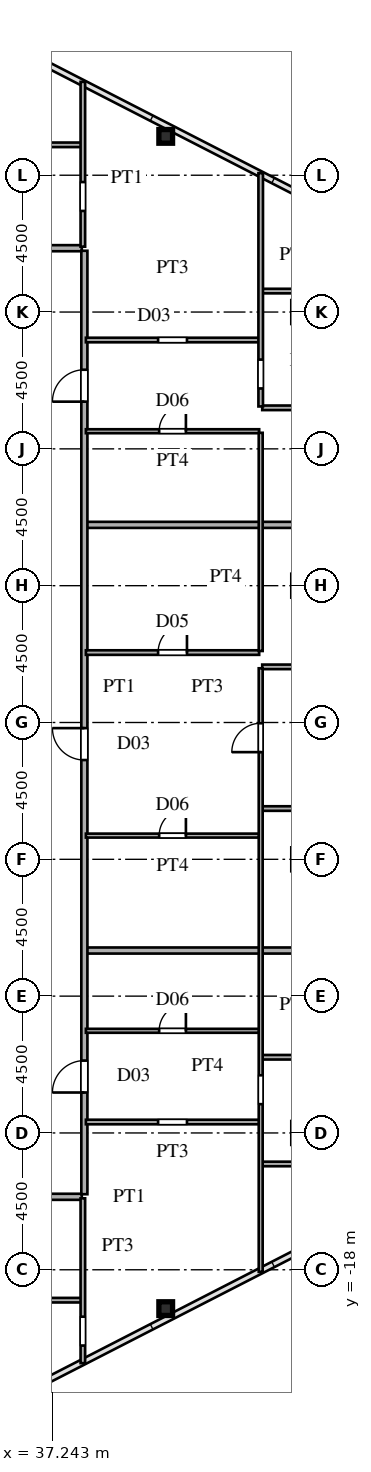
"""IFC4 building model, lengths in metres.
Left out: names, types, materials, properties, quantities, classifications, styles, units other than length and angle.
Written with IfcOpenShell. Run it as: python <this file> out.ifc"""

import sys

from ifc_helpers import new_model, si_unit, direction, frame, frame_2d, origin, origin_2d, place, context, subcontext, project, spatial, rectangle, hollow_rectangle, extrude, source, transform, mapped, element, fill, save


model = new_model("IFC4")
c1 = context("Model", 3, precision=1e-05, world=origin(), true_north=direction((0.0, 1.0)))
c2 = subcontext(c1, "Body", "Model", "MODEL_VIEW")
j1 = project(units=[si_unit("LENGTHUNIT", "METRE"), si_unit("PLANEANGLEUNIT", "RADIAN")], contexts=[c1])
p1 = place(None, origin())
s1 = spatial("IfcSite", under=j1, at=p1, CompositionType="ELEMENT")
p2 = place(p1, origin())
s2 = spatial("IfcBuilding", under=s1, at=p2, CompositionType="ELEMENT")
p3 = place(p2, frame((0.0, 0.0, 114.0)))
s3 = spatial("IfcBuildingStorey", under=s2, at=p3, CompositionType="ELEMENT", Elevation=114.0)
m1 = source(origin(), c2, "Body", "SweptSolid", [
    extrude(hollow_rectangle(XDim=0.45, YDim=0.45, WallThickness=0.018, at=origin_2d()), origin(), (0.0, 0.0, 1.0), 3.6),
])
for number, where, z_axis, x_axis in (
    (1, (40.976, -19.278, 0.0), (0.0, 0.0, 1.0), (1.0, 0.0, 0.0)),
    (2, (40.976, 19.278, 0.0), (0.0, 0.0, 1.0), (1.0, 0.0, 0.0)),
):
    element("IfcColumn", number, at=place(p3, frame(where, z_axis=z_axis, x_axis=x_axis)), inside=s3, PredefinedType="COLUMN", context=c2, shape_type="MappedRepresentation", body=[
        mapped(m1, transform((0.0, 0.0, 0.0), scale=1.0)),
    ])
p4 = place(p3, frame((27.465, -19.0, 0.0), z_axis=(0.0, 0.0, 1.0), x_axis=(1.0, 0.0, 0.0)))
e3 = element("IfcWall", 3, at=p4, inside=s3, PredefinedType="PARTITIONING", context=c2, shape_type="SweptSolid", body=[
    extrude(rectangle(XDim=10.735, YDim=0.15, at=frame_2d((5.367, 0.0))), origin(), (0.0, 0.0, 1.0), 3.38),
])
p5 = place(p4, frame((4.935, 0.0, 0.0)))
e4 = element("IfcOpeningElement", 4, at=p5, cuts=e3, PredefinedType="OPENING", context=c2, shape_type="SweptSolid", body=[
    extrude(rectangle(XDim=0.95, YDim=2.15, at=frame_2d((0.475, 1.075))), frame((0.0, 0.085, 0.0), z_axis=(0.0, -1.0, 0.0), x_axis=(1.0, 0.0, 0.0)), (0.0, 0.0, 1.0), 0.17),
])
p6 = place(p3, frame((36.585, -15.6, 0.0), z_axis=(0.0, 0.0, 1.0), x_axis=(1.0, 0.0, 0.0)))
e5 = element("IfcWall", 5, at=p6, inside=s3, PredefinedType="PARTITIONING", context=c2, shape_type="SweptSolid", body=[
    extrude(rectangle(XDim=1.63, YDim=0.2, at=frame_2d((0.815, 0.0))), origin(), (0.0, 0.0, 1.0), 3.38),
])
p7 = place(p3, frame((44.15, -14.52, 0.0), z_axis=(0.0, 0.0, 1.0), x_axis=(1.0, 0.0, 0.0)))
e6 = element("IfcWall", 6, at=p7, inside=s3, PredefinedType="PARTITIONING", context=c2, shape_type="SweptSolid", body=[
    extrude(rectangle(XDim=6.828, YDim=0.15, at=frame_2d((3.414, 0.0))), origin(), (0.0, 0.0, 1.0), 2.78),
])
p8 = place(p7, frame((2.896, 0.0, 0.0)))
e7 = element("IfcOpeningElement", 7, at=p8, cuts=e6, PredefinedType="OPENING", context=c2, shape_type="SweptSolid", body=[
    extrude(rectangle(XDim=0.95, YDim=2.15, at=frame_2d((0.475, 1.075))), frame((0.0, 0.085, 0.0), z_axis=(0.0, -1.0, 0.0), x_axis=(1.0, 0.0, 0.0)), (0.0, 0.0, 1.0), 0.17),
])
p9 = place(p3, frame((38.35, -13.14, 0.0), z_axis=(0.0, 0.0, 1.0), x_axis=(1.0, 0.0, 0.0)))
e8 = element("IfcWall", 8, at=p9, inside=s3, PredefinedType="PARTITIONING", context=c2, shape_type="SweptSolid", body=[
    extrude(rectangle(XDim=5.7, YDim=0.15, at=frame_2d((2.85, 0.0))), origin(), (0.0, 0.0, 1.0), 3.38),
])
p10 = place(p9, frame((2.375, 0.0, 0.0)))
e9 = element("IfcOpeningElement", 9, at=p10, cuts=e8, PredefinedType="OPENING", context=c2, shape_type="SweptSolid", body=[
    extrude(rectangle(XDim=0.95, YDim=2.15, at=frame_2d((0.475, 1.075))), frame((0.0, 0.085, 0.0), z_axis=(0.0, -1.0, 0.0), x_axis=(1.0, 0.0, 0.0)), (0.0, 0.0, 1.0), 0.17),
])
p11 = place(p3, frame((44.15, -11.01, 0.0), z_axis=(0.0, 0.0, 1.0), x_axis=(1.0, 0.0, 0.0)))
e10 = element("IfcWall", 10, at=p11, inside=s3, PredefinedType="PARTITIONING", context=c2, shape_type="SweptSolid", body=[
    extrude(rectangle(XDim=10.3, YDim=0.15, at=frame_2d((5.15, 0.0))), origin(), (0.0, 0.0, 1.0), 3.38),
])
p12 = place(p11, frame((4.675, 0.0, 0.0)))
e11 = element("IfcOpeningElement", 11, at=p12, cuts=e10, PredefinedType="OPENING", context=c2, shape_type="SweptSolid", body=[
    extrude(rectangle(XDim=0.95, YDim=2.15, at=frame_2d((0.475, 1.075))), frame((0.0, 0.085, 0.0), z_axis=(0.0, -1.0, 0.0), x_axis=(1.0, 0.0, 0.0)), (0.0, 0.0, 1.0), 0.17),
])
p13 = place(p3, frame((38.35, -10.14, 0.0), z_axis=(0.0, 0.0, 1.0), x_axis=(1.0, 0.0, 0.0)))
e12 = element("IfcWall", 12, at=p13, inside=s3, PredefinedType="PARTITIONING", context=c2, shape_type="SweptSolid", body=[
    extrude(rectangle(XDim=5.7, YDim=0.13, at=frame_2d((2.85, 0.0))), origin(), (0.0, 0.0, 1.0), 3.38),
])
p14 = place(p13, frame((2.41, 0.0, 0.0)))
e13 = element("IfcOpeningElement", 13, at=p14, cuts=e12, PredefinedType="OPENING", context=c2, shape_type="SweptSolid", body=[
    extrude(rectangle(XDim=0.88, YDim=2.1, at=frame_2d((0.44, 1.05))), frame((0.0, 0.075, 0.0), z_axis=(0.0, -1.0, 0.0), x_axis=(1.0, 0.0, 0.0)), (0.0, 0.0, 1.0), 0.15),
])
p15 = place(p3, frame((38.38, -7.5, 0.0), z_axis=(0.0, 0.0, 1.0), x_axis=(1.0, 0.0, 0.0)))
e14 = element("IfcWall", 14, at=p15, inside=s3, PredefinedType="PARTITIONING", context=c2, shape_type="SweptSolid", body=[
    extrude(rectangle(XDim=26.259, YDim=0.2, at=frame_2d((13.129, 0.0))), origin(), (0.0, 0.0, 1.0), 3.38),
])
p16 = place(p3, frame((38.35, -3.72, 0.0), z_axis=(0.0, 0.0, 1.0), x_axis=(1.0, 0.0, 0.0)))
e15 = element("IfcWall", 15, at=p16, inside=s3, PredefinedType="PARTITIONING", context=c2, shape_type="SweptSolid", body=[
    extrude(rectangle(XDim=5.7, YDim=0.13, at=frame_2d((2.85, 0.0))), origin(), (0.0, 0.0, 1.0), 3.38),
])
p17 = place(p16, frame((2.41, 0.0, 0.0)))
e16 = element("IfcOpeningElement", 16, at=p17, cuts=e15, PredefinedType="OPENING", context=c2, shape_type="SweptSolid", body=[
    extrude(rectangle(XDim=0.88, YDim=2.1, at=frame_2d((0.44, 1.05))), frame((0.0, 0.075, 0.0), z_axis=(0.0, -1.0, 0.0), x_axis=(1.0, 0.0, 0.0)), (0.0, 0.0, 1.0), 0.15),
])
p18 = place(p3, frame((44.15, -2.83, 0.0), z_axis=(0.0, 0.0, 1.0), x_axis=(1.0, 0.0, 0.0)))
e17 = element("IfcWall", 17, at=p18, inside=s3, PredefinedType="PARTITIONING", context=c2, shape_type="SweptSolid", body=[
    extrude(rectangle(XDim=25.385, YDim=0.15, at=frame_2d((12.692, 0.0))), origin(), (0.0, 0.0, 1.0), 3.38),
])
p19 = place(p18, frame((4.675, 0.0, 0.0)))
e18 = element("IfcOpeningElement", 18, at=p19, cuts=e17, PredefinedType="OPENING", context=c2, shape_type="SweptSolid", body=[
    extrude(rectangle(XDim=0.95, YDim=2.15, at=frame_2d((0.475, 1.075))), frame((0.0, 0.085, 0.0), z_axis=(0.0, -1.0, 0.0), x_axis=(1.0, 0.0, 0.0)), (0.0, 0.0, 1.0), 0.17),
])
p20 = place(p18, frame((12.725, 0.0, 0.0)))
e19 = element("IfcOpeningElement", 19, at=p20, cuts=e17, PredefinedType="OPENING", context=c2, shape_type="SweptSolid", body=[
    extrude(rectangle(XDim=0.95, YDim=2.15, at=frame_2d((0.475, 1.075))), frame((0.0, 0.085, 0.0), z_axis=(0.0, -1.0, 0.0), x_axis=(1.0, 0.0, 0.0)), (0.0, 0.0, 1.0), 0.17),
])
p21 = place(p3, frame((44.15, 1.83, 0.0), z_axis=(0.0, 0.0, 1.0), x_axis=(1.0, 0.0, 0.0)))
e20 = element("IfcWall", 20, at=p21, inside=s3, PredefinedType="PARTITIONING", context=c2, shape_type="SweptSolid", body=[
    extrude(rectangle(XDim=25.385, YDim=0.15, at=frame_2d((12.692, 0.0))), origin(), (0.0, 0.0, 1.0), 3.38),
])
p22 = place(p21, frame((4.675, 0.0, 0.0)))
e21 = element("IfcOpeningElement", 21, at=p22, cuts=e20, PredefinedType="OPENING", context=c2, shape_type="SweptSolid", body=[
    extrude(rectangle(XDim=0.95, YDim=2.15, at=frame_2d((0.475, 1.075))), frame((0.0, 0.085, 0.0), z_axis=(0.0, -1.0, 0.0), x_axis=(1.0, 0.0, 0.0)), (0.0, 0.0, 1.0), 0.17),
])
p23 = place(p21, frame((12.725, 0.0, 0.0)))
e22 = element("IfcOpeningElement", 22, at=p23, cuts=e20, PredefinedType="OPENING", context=c2, shape_type="SweptSolid", body=[
    extrude(rectangle(XDim=0.95, YDim=2.15, at=frame_2d((0.475, 1.075))), frame((0.0, 0.085, 0.0), z_axis=(0.0, -1.0, 0.0), x_axis=(1.0, 0.0, 0.0)), (0.0, 0.0, 1.0), 0.17),
])
p24 = place(p3, frame((38.35, 2.3, 0.0), z_axis=(0.0, 0.0, 1.0), x_axis=(1.0, 0.0, 0.0)))
e23 = element("IfcWall", 23, at=p24, inside=s3, PredefinedType="PARTITIONING", context=c2, shape_type="SweptSolid", body=[
    extrude(rectangle(XDim=5.7, YDim=0.15, at=frame_2d((2.85, 0.0))), origin(), (0.0, 0.0, 1.0), 3.38),
])
p25 = place(p24, frame((2.375, 0.0, 0.0)))
e24 = element("IfcOpeningElement", 24, at=p25, cuts=e23, PredefinedType="OPENING", context=c2, shape_type="SweptSolid", body=[
    extrude(rectangle(XDim=0.95, YDim=2.15, at=frame_2d((0.475, 1.075))), frame((0.0, 0.085, 0.0), z_axis=(0.0, -1.0, 0.0), x_axis=(1.0, 0.0, 0.0)), (0.0, 0.0, 1.0), 0.17),
])
p26 = place(p3, frame((38.38, 6.5, 0.0), z_axis=(0.0, 0.0, 1.0), x_axis=(1.0, 0.0, 0.0)))
e25 = element("IfcWall", 25, at=p26, inside=s3, PredefinedType="PARTITIONING", context=c2, shape_type="SweptSolid", body=[
    extrude(rectangle(XDim=28.208, YDim=0.2, at=frame_2d((14.104, 0.0))), origin(), (0.0, 0.0, 1.0), 3.38),
])
p27 = place(p3, frame((38.35, 9.58, 0.0), z_axis=(0.0, 0.0, 1.0), x_axis=(1.0, 0.0, 0.0)))
e26 = element("IfcWall", 26, at=p27, inside=s3, PredefinedType="PARTITIONING", context=c2, shape_type="SweptSolid", body=[
    extrude(rectangle(XDim=5.7, YDim=0.13, at=frame_2d((2.85, 0.0))), origin(), (0.0, 0.0, 1.0), 3.38),
])
p28 = place(p27, frame((2.41, 0.0, 0.0)))
e27 = element("IfcOpeningElement", 27, at=p28, cuts=e26, PredefinedType="OPENING", context=c2, shape_type="SweptSolid", body=[
    extrude(rectangle(XDim=0.88, YDim=2.1, at=frame_2d((0.44, 1.05))), frame((0.0, 0.075, 0.0), z_axis=(0.0, -1.0, 0.0), x_axis=(1.0, 0.0, 0.0)), (0.0, 0.0, 1.0), 0.15),
])
p29 = place(p3, frame((44.15, 10.35, 0.0), z_axis=(0.0, 0.0, 1.0), x_axis=(1.0, 0.0, 0.0)))
e28 = element("IfcWall", 28, at=p29, inside=s3, PredefinedType="PARTITIONING", context=c2, shape_type="SweptSolid", body=[
    extrude(rectangle(XDim=10.3, YDim=0.15, at=frame_2d((5.15, 0.0))), origin(), (0.0, 0.0, 1.0), 3.38),
])
p30 = place(p29, frame((4.675, 0.0, 0.0)))
e29 = element("IfcOpeningElement", 29, at=p30, cuts=e28, PredefinedType="OPENING", context=c2, shape_type="SweptSolid", body=[
    extrude(rectangle(XDim=0.95, YDim=2.15, at=frame_2d((0.475, 1.075))), frame((0.0, 0.085, 0.0), z_axis=(0.0, -1.0, 0.0), x_axis=(1.0, 0.0, 0.0)), (0.0, 0.0, 1.0), 0.17),
])
p31 = place(p3, frame((38.35, 12.58, 0.0), z_axis=(0.0, 0.0, 1.0), x_axis=(1.0, 0.0, 0.0)))
e30 = element("IfcWall", 30, at=p31, inside=s3, PredefinedType="PARTITIONING", context=c2, shape_type="SweptSolid", body=[
    extrude(rectangle(XDim=5.7, YDim=0.15, at=frame_2d((2.85, 0.0))), origin(), (0.0, 0.0, 1.0), 3.38),
])
p32 = place(p31, frame((2.375, 0.0, 0.0)))
e31 = element("IfcOpeningElement", 31, at=p32, cuts=e30, PredefinedType="OPENING", context=c2, shape_type="SweptSolid", body=[
    extrude(rectangle(XDim=0.95, YDim=2.15, at=frame_2d((0.475, 1.075))), frame((0.0, 0.085, 0.0), z_axis=(0.0, -1.0, 0.0), x_axis=(1.0, 0.0, 0.0)), (0.0, 0.0, 1.0), 0.17),
])
p33 = place(p3, frame((44.15, 14.19, 0.0), z_axis=(0.0, 0.0, 1.0), x_axis=(1.0, 0.0, 0.0)))
e32 = element("IfcWall", 32, at=p33, inside=s3, PredefinedType="PARTITIONING", context=c2, shape_type="SweptSolid", body=[
    extrude(rectangle(XDim=7.477, YDim=0.15, at=frame_2d((3.739, 0.0))), origin(), (0.0, 0.0, 1.0), 2.78),
])
p34 = place(p33, frame((3.221, 0.0, 0.0)))
e33 = element("IfcOpeningElement", 33, at=p34, cuts=e32, PredefinedType="OPENING", context=c2, shape_type="SweptSolid", body=[
    extrude(rectangle(XDim=0.95, YDim=2.15, at=frame_2d((0.475, 1.075))), frame((0.0, 0.085, 0.0), z_axis=(0.0, -1.0, 0.0), x_axis=(1.0, 0.0, 0.0)), (0.0, 0.0, 1.0), 0.17),
])
p35 = place(p3, frame((36.585, 15.6, 0.0), z_axis=(0.0, 0.0, 1.0), x_axis=(1.0, 0.0, 0.0)))
e34 = element("IfcWall", 34, at=p35, inside=s3, PredefinedType="PARTITIONING", context=c2, shape_type="SweptSolid", body=[
    extrude(rectangle(XDim=1.63, YDim=0.2, at=frame_2d((0.815, 0.0))), origin(), (0.0, 0.0, 1.0), 3.38),
])
p36 = place(p3, frame((27.465, 19.0, 0.0), z_axis=(0.0, 0.0, 1.0), x_axis=(1.0, 0.0, 0.0)))
e35 = element("IfcWall", 35, at=p36, inside=s3, PredefinedType="PARTITIONING", context=c2, shape_type="SweptSolid", body=[
    extrude(rectangle(XDim=10.735, YDim=0.15, at=frame_2d((5.367, 0.0))), origin(), (0.0, 0.0, 1.0), 3.38),
])
p37 = place(p36, frame((4.935, 0.0, 0.0)))
e36 = element("IfcOpeningElement", 36, at=p37, cuts=e35, PredefinedType="OPENING", context=c2, shape_type="SweptSolid", body=[
    extrude(rectangle(XDim=0.95, YDim=2.15, at=frame_2d((0.475, 1.075))), frame((0.0, 0.085, 0.0), z_axis=(0.0, -1.0, 0.0), x_axis=(1.0, 0.0, 0.0)), (0.0, 0.0, 1.0), 0.17),
])
p38 = place(p3, frame((38.25, -21.071, 0.0), z_axis=(0.0, 0.0, 1.0), x_axis=(0.0, 1.0, 0.0)))
e37 = element("IfcWall", 37, at=p38, inside=s3, PredefinedType="PARTITIONING", context=c2, shape_type="SweptSolid", body=[
    extrude(rectangle(XDim=5.421, YDim=0.15, at=frame_2d((2.71, 0.0))), origin(), (0.0, 0.0, 1.0), 3.38),
])
p39 = place(p38, frame((0.578, 0.0, 0.0)))
e38 = element("IfcOpeningElement", 38, at=p39, cuts=e37, PredefinedType="OPENING", context=c2, shape_type="SweptSolid", body=[
    extrude(rectangle(XDim=0.95, YDim=2.15, at=frame_2d((0.475, 1.075))), frame((0.0, 0.085, 0.0), z_axis=(0.0, -1.0, 0.0), x_axis=(1.0, 0.0, 0.0)), (0.0, 0.0, 1.0), 0.17),
])
p40 = place(p3, frame((38.25, 15.65, 0.0), z_axis=(0.0, 0.0, 1.0), x_axis=(0.0, 1.0, 0.0)))
e39 = element("IfcWall", 39, at=p40, inside=s3, PredefinedType="PARTITIONING", context=c2, shape_type="SweptSolid", body=[
    extrude(rectangle(XDim=5.421, YDim=0.15, at=frame_2d((2.71, 0.0))), origin(), (0.0, 0.0, 1.0), 3.38),
])
p41 = place(p40, frame((1.175, 0.0, 0.0)))
e40 = element("IfcOpeningElement", 40, at=p41, cuts=e39, PredefinedType="OPENING", context=c2, shape_type="SweptSolid", body=[
    extrude(rectangle(XDim=0.95, YDim=2.15, at=frame_2d((0.475, 1.075))), frame((0.0, 0.085, 0.0), z_axis=(0.0, -1.0, 0.0), x_axis=(1.0, 0.0, 0.0)), (0.0, 0.0, 1.0), 0.17),
])
p42 = place(p3, frame((38.3, -15.515, 0.0), z_axis=(0.0, 0.0, 1.0), x_axis=(0.0, 1.0, 0.0)))
e41 = element("IfcWall", 41, at=p42, inside=s3, PredefinedType="PARTITIONING", context=c2, shape_type="SweptSolid", body=[
    extrude(rectangle(XDim=31.03, YDim=0.2, at=frame_2d((15.515, 0.0))), origin(), (0.0, 0.0, 1.0), 3.38),
])
p43 = place(p42, frame((3.345, 0.0, 0.0)))
e42 = element("IfcOpeningElement", 42, at=p43, cuts=e41, PredefinedType="OPENING", context=c2, shape_type="SweptSolid", body=[
    extrude(rectangle(XDim=1.05, YDim=2.25, at=frame_2d((0.525, 1.125))), frame((0.0, 0.11, 0.0), z_axis=(0.0, -1.0, 0.0), x_axis=(1.0, 0.0, 0.0)), (0.0, 0.0, 1.0), 0.22),
])
p44 = place(p42, frame((14.28, 0.0, 0.0)))
e43 = element("IfcOpeningElement", 43, at=p44, cuts=e41, PredefinedType="OPENING", context=c2, shape_type="SweptSolid", body=[
    extrude(rectangle(XDim=1.05, YDim=2.25, at=frame_2d((0.525, 1.125))), frame((0.0, 0.11, 0.0), z_axis=(0.0, -1.0, 0.0), x_axis=(1.0, 0.0, 0.0)), (0.0, 0.0, 1.0), 0.22),
])
p45 = place(p42, frame((26.067, 0.0, 0.0)))
e44 = element("IfcOpeningElement", 44, at=p45, cuts=e41, PredefinedType="OPENING", context=c2, shape_type="SweptSolid", body=[
    extrude(rectangle(XDim=1.05, YDim=2.25, at=frame_2d((0.525, 1.125))), frame((0.0, 0.11, 0.0), z_axis=(0.0, -1.0, 0.0), x_axis=(1.0, 0.0, 0.0)), (0.0, 0.0, 1.0), 0.22),
])
p46 = place(p3, frame((44.1, -18.069, 0.0), z_axis=(0.0, 0.0, 1.0), x_axis=(0.0, 1.0, 0.0)))
e45 = element("IfcWall", 45, at=p46, inside=s3, PredefinedType="PARTITIONING", context=c2, shape_type="SweptSolid", body=[
    extrude(rectangle(XDim=19.852, YDim=0.13, at=frame_2d((9.926, 0.0))), origin(), (0.0, 0.0, 1.0), 3.38),
])
p47 = place(p46, frame((5.516, 0.0, 0.0)))
e46 = element("IfcOpeningElement", 46, at=p47, cuts=e45, PredefinedType="OPENING", context=c2, shape_type="SweptSolid", body=[
    extrude(rectangle(XDim=0.95, YDim=2.15, at=frame_2d((0.475, 1.075))), frame((0.0, 0.075, 0.0), z_axis=(0.0, -1.0, 0.0), x_axis=(1.0, 0.0, 0.0)), (0.0, 0.0, 1.0), 0.15),
])
p48 = place(p46, frame((17.094, 0.0, 0.0)))
e47 = element("IfcOpeningElement", 47, at=p48, cuts=e45, PredefinedType="OPENING", context=c2, shape_type="SweptSolid", body=[
    extrude(rectangle(XDim=0.95, YDim=2.15, at=frame_2d((0.475, 1.075))), frame((0.0, 0.075, 0.0), z_axis=(0.0, -1.0, 0.0), x_axis=(1.0, 0.0, 0.0)), (0.0, 0.0, 1.0), 0.15),
])
p49 = place(p3, frame((44.1, 2.352, 0.0), z_axis=(0.0, 0.0, 1.0), x_axis=(0.0, 1.0, 0.0)))
e48 = element("IfcWall", 48, at=p49, inside=s3, PredefinedType="PARTITIONING", context=c2, shape_type="SweptSolid", body=[
    extrude(rectangle(XDim=7.176, YDim=0.13, at=frame_2d((3.588, 0.0))), origin(), (0.0, 0.0, 1.0), 3.38),
])
p50 = place(p3, frame((44.1, 10.395, 0.0), z_axis=(0.0, 0.0, 1.0), x_axis=(0.0, 1.0, 0.0)))
e49 = element("IfcWall", 49, at=p50, inside=s3, PredefinedType="PARTITIONING", context=c2, shape_type="SweptSolid", body=[
    extrude(rectangle(XDim=7.674, YDim=0.15, at=frame_2d((3.837, 0.0))), origin(), (0.0, 0.0, 1.0), 3.38),
])
p51 = place(p50, frame((0.591, 0.0, 0.0)))
e50 = element("IfcOpeningElement", 50, at=p51, cuts=e49, PredefinedType="OPENING", context=c2, shape_type="SweptSolid", body=[
    extrude(rectangle(XDim=0.95, YDim=2.15, at=frame_2d((0.475, 1.075))), frame((0.0, 0.085, 0.0), z_axis=(0.0, -1.0, 0.0), x_axis=(1.0, 0.0, 0.0)), (0.0, 0.0, 1.0), 0.17),
])
m2 = source(origin(), c2, "Body", "SweptSolid", [
    extrude(rectangle(XDim=0.88, YDim=2.1, at=frame_2d((0.44, 1.05))), frame((0.0, 0.025, 0.0), z_axis=(0.0, -1.0, 0.0), x_axis=(1.0, 0.0, 0.0)), (0.0, 0.0, 1.0), 0.05),
])
p52 = place(p14, origin())
e51 = element("IfcDoor", 51, at=p52, inside=s3, OperationType="SINGLE_SWING_RIGHT", PredefinedType="DOOR", context=c2, shape_type="MappedRepresentation", body=[
    mapped(m2, transform((0.0, 0.0, 0.0), scale=1.0)),
])
fill(e13, e51)
p53 = place(p17, origin())
e52 = element("IfcDoor", 52, at=p53, inside=s3, OperationType="SINGLE_SWING_RIGHT", PredefinedType="DOOR", context=c2, shape_type="MappedRepresentation", body=[
    mapped(m2, transform((0.0, 0.0, 0.0), scale=1.0)),
])
fill(e16, e52)
m3 = source(origin(), c2, "Body", "SweptSolid", [
    extrude(rectangle(XDim=0.95, YDim=2.15, at=frame_2d((0.475, 1.075))), frame((0.0, 0.025, 0.0), z_axis=(0.0, -1.0, 0.0), x_axis=(1.0, 0.0, 0.0)), (0.0, 0.0, 1.0), 0.05),
])
p54 = place(p25, origin())
e53 = element("IfcDoor", 53, at=p54, inside=s3, OperationType="SINGLE_SWING_RIGHT", PredefinedType="DOOR", context=c2, shape_type="MappedRepresentation", body=[
    mapped(m3, transform((0.0, 0.0, 0.0), scale=1.0)),
])
fill(e24, e53)
p55 = place(p28, origin())
e54 = element("IfcDoor", 54, at=p55, inside=s3, OperationType="SINGLE_SWING_RIGHT", PredefinedType="DOOR", context=c2, shape_type="MappedRepresentation", body=[
    mapped(m2, transform((0.0, 0.0, 0.0), scale=1.0)),
])
fill(e27, e54)
m4 = source(origin(), c2, "Body", "SweptSolid", [
    extrude(rectangle(XDim=1.05, YDim=2.25, at=frame_2d((0.525, 1.125))), frame((0.0, 0.025, 0.0), z_axis=(0.0, -1.0, 0.0), x_axis=(1.0, 0.0, 0.0)), (0.0, 0.0, 1.0), 0.05),
])
p56 = place(p43, origin())
e55 = element("IfcDoor", 55, at=p56, inside=s3, OperationType="SINGLE_SWING_LEFT", PredefinedType="DOOR", context=c2, shape_type="MappedRepresentation", body=[
    mapped(m4, transform((0.0, 0.0, 0.0), scale=1.0)),
])
fill(e42, e55)
p57 = place(p44, origin())
e56 = element("IfcDoor", 56, at=p57, inside=s3, OperationType="SINGLE_SWING_RIGHT", PredefinedType="DOOR", context=c2, shape_type="MappedRepresentation", body=[
    mapped(m4, transform((0.0, 0.0, 0.0), scale=1.0)),
])
fill(e43, e56)
p58 = place(p45, origin())
e57 = element("IfcDoor", 57, at=p58, inside=s3, OperationType="SINGLE_SWING_LEFT", PredefinedType="DOOR", context=c2, shape_type="MappedRepresentation", body=[
    mapped(m4, transform((0.0, 0.0, 0.0), scale=1.0)),
])
fill(e44, e57)
p59 = place(p48, origin())
e58 = element("IfcDoor", 58, at=p59, inside=s3, OperationType="SINGLE_SWING_LEFT", PredefinedType="DOOR", context=c2, shape_type="MappedRepresentation", body=[
    mapped(m3, transform((0.0, 0.0, 0.0), scale=1.0)),
])
fill(e47, e58)
save(model, sys.argv[1])
